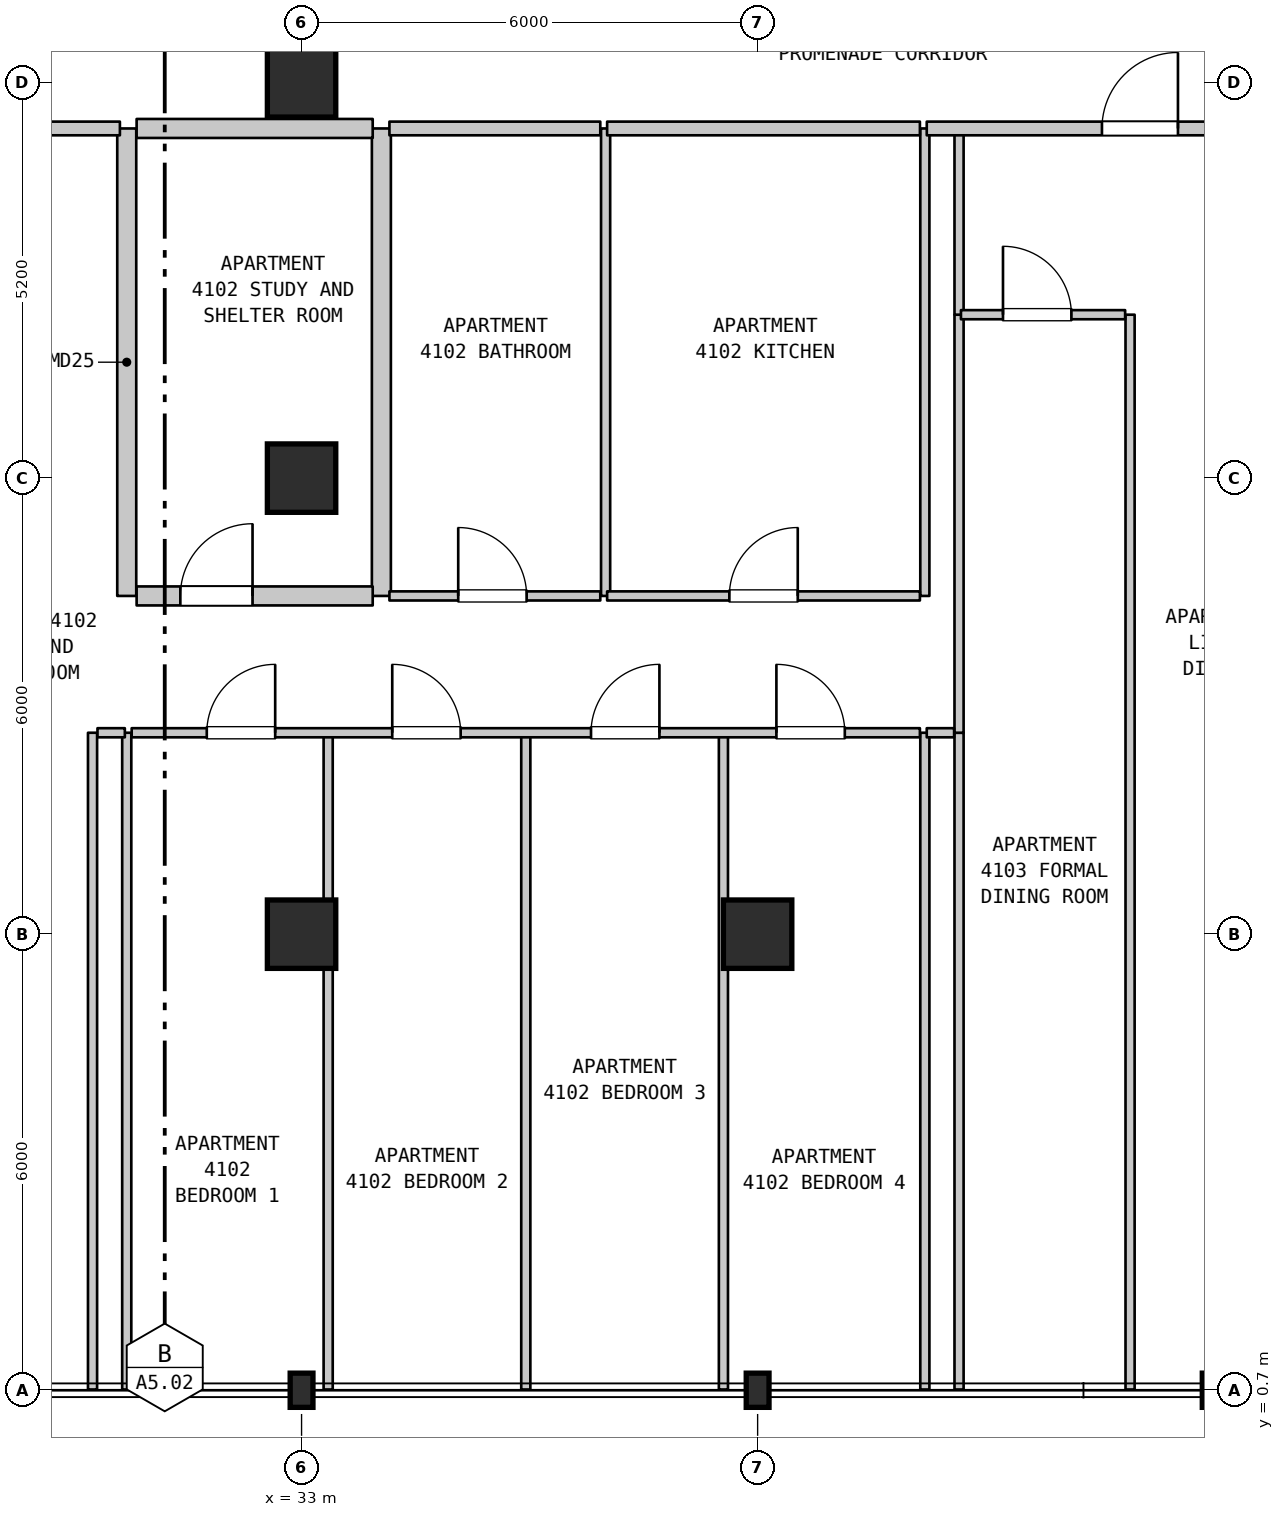
"""IFC4 building model, lengths in metres.
Left out: names, types, materials, properties, quantities, classifications, styles, units other than length and angle.
Written with IfcOpenShell. Run it as: python <this file> out.ifc"""

import sys

from ifc_helpers import new_model, si_unit, direction, frame, frame_2d, origin, origin_2d, place, context, subcontext, project, spatial, rectangle, i_section, extrude, element, fill, save


model = new_model("IFC4")
c1 = context("Model", 3, precision=1e-05, world=origin(), true_north=direction((0.0, 1.0)))
c2 = subcontext(c1, "Body", "Model", "MODEL_VIEW")
j1 = project(units=[si_unit("LENGTHUNIT", "METRE"), si_unit("PLANEANGLEUNIT", "RADIAN")], contexts=[c1])
p1 = place(None, origin())
s1 = spatial("IfcSite", under=j1, at=p1, CompositionType="ELEMENT")
p2 = place(p1, origin())
s2 = spatial("IfcBuilding", under=s1, at=p2, CompositionType="ELEMENT")
p3 = place(p2, frame((0.0, 0.0, 169.1)))
s3 = spatial("IfcBuildingStorey", under=s2, at=p3, CompositionType="ELEMENT", Elevation=169.1)
p4 = place(p3, frame((33.0, 0.7, 0.0), z_axis=(0.0, 0.0, 1.0), x_axis=(1.0, 0.0, 0.0)))
e1 = element("IfcColumn", 1, at=p4, inside=s3, PredefinedType="COLUMN", context=c2, shape_type="SweptSolid", body=[
    extrude(i_section(OverallWidth=0.3, OverallDepth=0.45, WebThickness=0.014, FlangeThickness=0.026, FilletRadius=0.027, at=origin_2d()), origin(), (0.0, 0.0, 1.0), 3.7),
])
for number, where, z_axis, x_axis in (
    (2, (33.0, 6.7, 0.0), (0.0, 0.0, 1.0), (1.0, 0.0, 0.0)),
    (3, (33.0, 12.7, 0.0), (0.0, 0.0, 1.0), (1.0, 0.0, 0.0)),
    (4, (33.0, 17.9, 0.0), (0.0, 0.0, 1.0), (1.0, 0.0, 0.0)),
):
    element("IfcColumn", number, at=place(p3, frame(where, z_axis=z_axis, x_axis=x_axis)), inside=s3, PredefinedType="COLUMN", context=c2, shape_type="SweptSolid", body=[
        extrude(rectangle(XDim=0.9, YDim=0.9, at=origin_2d()), origin(), (0.0, 0.0, 1.0), 3.7),
    ])
p5 = place(p3, frame((39.0, 0.7, 0.0), z_axis=(0.0, 0.0, 1.0), x_axis=(1.0, 0.0, 0.0)))
e5 = element("IfcColumn", 5, at=p5, inside=s3, PredefinedType="COLUMN", context=c2, shape_type="SweptSolid", body=[
    extrude(i_section(OverallWidth=0.3, OverallDepth=0.45, WebThickness=0.014, FlangeThickness=0.026, FilletRadius=0.027, at=origin_2d()), origin(), (0.0, 0.0, 1.0), 3.7),
])
p6 = place(p3, frame((39.0, 6.7, 0.0), z_axis=(0.0, 0.0, 1.0), x_axis=(1.0, 0.0, 0.0)))
e6 = element("IfcColumn", 6, at=p6, inside=s3, PredefinedType="COLUMN", context=c2, shape_type="SweptSolid", body=[
    extrude(rectangle(XDim=0.9, YDim=0.9, at=origin_2d()), origin(), (0.0, 0.0, 1.0), 3.7),
])
p7 = place(p3, frame((45.0, 0.7, 0.0), z_axis=(0.0, 0.0, 1.0), x_axis=(1.0, 0.0, 0.0)))
e7 = element("IfcColumn", 7, at=p7, inside=s3, PredefinedType="COLUMN", context=c2, shape_type="SweptSolid", body=[
    extrude(i_section(OverallWidth=0.3, OverallDepth=0.45, WebThickness=0.014, FlangeThickness=0.026, FilletRadius=0.027, at=origin_2d()), origin(), (0.0, 0.0, 1.0), 3.7),
])
for number, where, z_axis, x_axis in (
    (8, (30.25, 0.71, 0.0), (0.0, 0.0, 1.0), (0.0, 1.0, 0.0)),
    (9, (30.7, 0.71, 0.0), (0.0, 0.0, 1.0), (0.0, 1.0, 0.0)),
):
    element("IfcWall", number, at=place(p3, frame(where, z_axis=z_axis, x_axis=x_axis)), inside=s3, PredefinedType="PARTITIONING", context=c2, shape_type="SweptSolid", body=[
        extrude(rectangle(XDim=8.64, YDim=0.12, at=frame_2d((4.32, 0.0))), origin(), (0.0, 0.0, 1.0), 3.39),
    ])
p8 = place(p3, frame((30.7, 11.15, 0.0), z_axis=(0.0, 0.0, 1.0), x_axis=(0.0, 1.0, 0.0)))
e10 = element("IfcWall", 10, at=p8, inside=s3, PredefinedType="STANDARD", context=c2, shape_type="SweptSolid", body=[
    extrude(rectangle(XDim=6.15, YDim=0.25, at=frame_2d((3.075, 0.0))), origin(), (0.0, 0.0, 1.0), 3.39),
])
p9 = place(p3, frame((33.35, 0.71, 0.0), z_axis=(0.0, 0.0, 1.0), x_axis=(0.0, 1.0, 0.0)))
e11 = element("IfcWall", 11, at=p9, inside=s3, PredefinedType="PARTITIONING", context=c2, shape_type="SweptSolid", body=[
    extrude(rectangle(XDim=8.64, YDim=0.12, at=frame_2d((4.32, 0.0))), origin(), (0.0, 0.0, 1.0), 3.39),
])
p10 = place(p3, frame((34.05, 11.15, 0.0), z_axis=(0.0, 0.0, 1.0), x_axis=(0.0, 1.0, 0.0)))
e12 = element("IfcWall", 12, at=p10, inside=s3, PredefinedType="STANDARD", context=c2, shape_type="SweptSolid", body=[
    extrude(rectangle(XDim=6.15, YDim=0.25, at=frame_2d((3.075, 0.0))), origin(), (0.0, 0.0, 1.0), 3.39),
])
p11 = place(p3, frame((35.95, 0.71, 0.0), z_axis=(0.0, 0.0, 1.0), x_axis=(0.0, 1.0, 0.0)))
e13 = element("IfcWall", 13, at=p11, inside=s3, PredefinedType="PARTITIONING", context=c2, shape_type="SweptSolid", body=[
    extrude(rectangle(XDim=8.64, YDim=0.12, at=frame_2d((4.32, 0.0))), origin(), (0.0, 0.0, 1.0), 3.39),
])
p12 = place(p3, frame((37.0, 11.15, 0.0), z_axis=(0.0, 0.0, 1.0), x_axis=(0.0, 1.0, 0.0)))
e14 = element("IfcWall", 14, at=p12, inside=s3, PredefinedType="PARTITIONING", context=c2, shape_type="SweptSolid", body=[
    extrude(rectangle(XDim=6.15, YDim=0.12, at=frame_2d((3.075, 0.0))), origin(), (0.0, 0.0, 1.0), 3.39),
])
for number, where, z_axis, x_axis in (
    (15, (38.55, 0.71, 0.0), (0.0, 0.0, 1.0), (0.0, 1.0, 0.0)),
    (16, (41.2, 0.71, 0.0), (0.0, 0.0, 1.0), (0.0, 1.0, 0.0)),
):
    element("IfcWall", number, at=place(p3, frame(where, z_axis=z_axis, x_axis=x_axis)), inside=s3, PredefinedType="PARTITIONING", context=c2, shape_type="SweptSolid", body=[
        extrude(rectangle(XDim=8.64, YDim=0.12, at=frame_2d((4.32, 0.0))), origin(), (0.0, 0.0, 1.0), 3.39),
    ])
p13 = place(p3, frame((41.2, 11.15, 0.0), z_axis=(0.0, 0.0, 1.0), x_axis=(0.0, 1.0, 0.0)))
e17 = element("IfcWall", 17, at=p13, inside=s3, PredefinedType="PARTITIONING", context=c2, shape_type="SweptSolid", body=[
    extrude(rectangle(XDim=6.15, YDim=0.12, at=frame_2d((3.075, 0.0))), origin(), (0.0, 0.0, 1.0), 3.39),
])
p14 = place(p3, frame((41.65, 0.71, 0.0), z_axis=(0.0, 0.0, 1.0), x_axis=(0.0, 1.0, 0.0)))
e18 = element("IfcWall", 18, at=p14, inside=s3, PredefinedType="PARTITIONING", context=c2, shape_type="SweptSolid", body=[
    extrude(rectangle(XDim=8.64, YDim=0.12, at=frame_2d((4.32, 0.0))), origin(), (0.0, 0.0, 1.0), 3.39),
])
p15 = place(p3, frame((41.65, 9.35, 0.0), z_axis=(0.0, 0.0, 1.0), x_axis=(0.0, 1.0, 0.0)))
e19 = element("IfcWall", 19, at=p15, inside=s3, PredefinedType="PARTITIONING", context=c2, shape_type="SweptSolid", body=[
    extrude(rectangle(XDim=5.5, YDim=0.12, at=frame_2d((2.75, 0.0))), origin(), (0.0, 0.0, 1.0), 3.39),
])
p16 = place(p3, frame((41.65, 14.85, 0.0), z_axis=(0.0, 0.0, 1.0), x_axis=(0.0, 1.0, 0.0)))
e20 = element("IfcWall", 20, at=p16, inside=s3, PredefinedType="PARTITIONING", context=c2, shape_type="SweptSolid", body=[
    extrude(rectangle(XDim=2.45, YDim=0.12, at=frame_2d((1.225, 0.0))), origin(), (0.0, 0.0, 1.0), 3.39),
])
p17 = place(p3, frame((43.9, 0.71, 0.0), z_axis=(0.0, 0.0, 1.0), x_axis=(0.0, 1.0, 0.0)))
e21 = element("IfcWall", 21, at=p17, inside=s3, PredefinedType="PARTITIONING", context=c2, shape_type="SweptSolid", body=[
    extrude(rectangle(XDim=14.14, YDim=0.12, at=frame_2d((7.07, 0.0))), origin(), (0.0, 0.0, 1.0), 3.39),
])
p18 = place(p3, frame((30.315, 9.35, 0.0), z_axis=(0.0, 0.0, 1.0), x_axis=(1.0, 0.0, 0.0)))
e22 = element("IfcWall", 22, at=p18, inside=s3, PredefinedType="PARTITIONING", context=c2, shape_type="SweptSolid", body=[
    extrude(rectangle(XDim=0.36, YDim=0.12, at=frame_2d((0.18, 0.0))), origin(), (0.0, 0.0, 1.0), 3.39),
])
p19 = place(p3, frame((30.765, 9.35, 0.0), z_axis=(0.0, 0.0, 1.0), x_axis=(1.0, 0.0, 0.0)))
e23 = element("IfcWall", 23, at=p19, inside=s3, PredefinedType="PARTITIONING", context=c2, shape_type="SweptSolid", body=[
    extrude(rectangle(XDim=10.37, YDim=0.12, at=frame_2d((5.185, 0.0))), origin(), (0.0, 0.0, 1.0), 3.39),
])
p20 = place(p19, frame((0.988, 0.0, 0.0)))
e24 = element("IfcOpeningElement", 24, at=p20, cuts=e23, PredefinedType="OPENING", context=c2, shape_type="SweptSolid", body=[
    extrude(rectangle(XDim=0.9, YDim=2.15, at=frame_2d((0.45, 1.075))), frame((0.0, 0.07, 0.0), z_axis=(0.0, -1.0, 0.0), x_axis=(1.0, 0.0, 0.0)), (0.0, 0.0, 1.0), 0.14),
])
p21 = place(p19, frame((3.428, 0.0, 0.0)))
e25 = element("IfcOpeningElement", 25, at=p21, cuts=e23, PredefinedType="OPENING", context=c2, shape_type="SweptSolid", body=[
    extrude(rectangle(XDim=0.9, YDim=2.15, at=frame_2d((0.45, 1.075))), frame((0.0, 0.07, 0.0), z_axis=(0.0, -1.0, 0.0), x_axis=(1.0, 0.0, 0.0)), (0.0, 0.0, 1.0), 0.14),
])
p22 = place(p19, frame((6.043, 0.0, 0.0)))
e26 = element("IfcOpeningElement", 26, at=p22, cuts=e23, PredefinedType="OPENING", context=c2, shape_type="SweptSolid", body=[
    extrude(rectangle(XDim=0.9, YDim=2.15, at=frame_2d((0.45, 1.075))), frame((0.0, 0.07, 0.0), z_axis=(0.0, -1.0, 0.0), x_axis=(1.0, 0.0, 0.0)), (0.0, 0.0, 1.0), 0.14),
])
p23 = place(p19, frame((8.482, 0.0, 0.0)))
e27 = element("IfcOpeningElement", 27, at=p23, cuts=e23, PredefinedType="OPENING", context=c2, shape_type="SweptSolid", body=[
    extrude(rectangle(XDim=0.9, YDim=2.15, at=frame_2d((0.45, 1.075))), frame((0.0, 0.07, 0.0), z_axis=(0.0, -1.0, 0.0), x_axis=(1.0, 0.0, 0.0)), (0.0, 0.0, 1.0), 0.14),
])
p24 = place(p3, frame((41.225, 9.35, 0.0), z_axis=(0.0, 0.0, 1.0), x_axis=(1.0, 0.0, 0.0)))
e28 = element("IfcWall", 28, at=p24, inside=s3, PredefinedType="PARTITIONING", context=c2, shape_type="SweptSolid", body=[
    extrude(rectangle(XDim=0.36, YDim=0.12, at=frame_2d((0.18, 0.0))), origin(), (0.0, 0.0, 1.0), 3.39),
])
p25 = place(p3, frame((30.83, 11.15, 0.0), z_axis=(0.0, 0.0, 1.0), x_axis=(1.0, 0.0, 0.0)))
e29 = element("IfcWall", 29, at=p25, inside=s3, PredefinedType="STANDARD", context=c2, shape_type="SweptSolid", body=[
    extrude(rectangle(XDim=3.106, YDim=0.25, at=frame_2d((1.553, 0.0))), origin(), (0.0, 0.0, 1.0), 3.39),
])
p26 = place(p25, frame((0.575, 0.0, 0.0)))
e30 = element("IfcOpeningElement", 30, at=p26, cuts=e29, PredefinedType="OPENING", context=c2, shape_type="SweptSolid", body=[
    extrude(rectangle(XDim=0.95, YDim=2.15, at=frame_2d((0.475, 1.075))), frame((0.0, 0.135, 0.0), z_axis=(0.0, -1.0, 0.0), x_axis=(1.0, 0.0, 0.0)), (0.0, 0.0, 1.0), 0.27),
])
p27 = place(p3, frame((34.156, 11.15, 0.0), z_axis=(0.0, 0.0, 1.0), x_axis=(1.0, 0.0, 0.0)))
e31 = element("IfcWall", 31, at=p27, inside=s3, PredefinedType="PARTITIONING", context=c2, shape_type="SweptSolid", body=[
    extrude(rectangle(XDim=2.774, YDim=0.12, at=frame_2d((1.387, 0.0))), origin(), (0.0, 0.0, 1.0), 3.39),
])
p28 = place(p27, frame((0.905, 0.0, 0.0)))
e32 = element("IfcOpeningElement", 32, at=p28, cuts=e31, PredefinedType="OPENING", context=c2, shape_type="SweptSolid", body=[
    extrude(rectangle(XDim=0.9, YDim=2.1, at=frame_2d((0.45, 1.05))), frame((0.0, 0.07, 0.0), z_axis=(0.0, -1.0, 0.0), x_axis=(1.0, 0.0, 0.0)), (0.0, 0.0, 1.0), 0.14),
])
p29 = place(p3, frame((37.02, 11.15, 0.0), z_axis=(0.0, 0.0, 1.0), x_axis=(1.0, 0.0, 0.0)))
e33 = element("IfcWall", 33, at=p29, inside=s3, PredefinedType="PARTITIONING", context=c2, shape_type="SweptSolid", body=[
    extrude(rectangle(XDim=4.115, YDim=0.12, at=frame_2d((2.058, 0.0))), origin(), (0.0, 0.0, 1.0), 3.39),
])
p30 = place(p29, frame((1.608, 0.0, 0.0)))
e34 = element("IfcOpeningElement", 34, at=p30, cuts=e33, PredefinedType="OPENING", context=c2, shape_type="SweptSolid", body=[
    extrude(rectangle(XDim=0.9, YDim=2.15, at=frame_2d((0.45, 1.075))), frame((0.0, 0.07, 0.0), z_axis=(0.0, -1.0, 0.0), x_axis=(1.0, 0.0, 0.0)), (0.0, 0.0, 1.0), 0.14),
])
p31 = place(p3, frame((41.675, 14.85, 0.0), z_axis=(0.0, 0.0, 1.0), x_axis=(1.0, 0.0, 0.0)))
e35 = element("IfcWall", 35, at=p31, inside=s3, PredefinedType="PARTITIONING", context=c2, shape_type="SweptSolid", body=[
    extrude(rectangle(XDim=2.16, YDim=0.12, at=frame_2d((1.08, 0.0))), origin(), (0.0, 0.0, 1.0), 3.39),
])
p32 = place(p31, frame((0.553, 0.0, 0.0)))
e36 = element("IfcOpeningElement", 36, at=p32, cuts=e35, PredefinedType="OPENING", context=c2, shape_type="SweptSolid", body=[
    extrude(rectangle(XDim=0.9, YDim=2.15, at=frame_2d((0.45, 1.075))), frame((0.0, 0.07, 0.0), z_axis=(0.0, -1.0, 0.0), x_axis=(1.0, 0.0, 0.0)), (0.0, 0.0, 1.0), 0.14),
])
p33 = place(p3, frame((25.515, 17.3, 0.0), z_axis=(0.0, 0.0, 1.0), x_axis=(1.0, 0.0, 0.0)))
e37 = element("IfcWall", 37, at=p33, inside=s3, PredefinedType="STANDARD", context=c2, shape_type="SweptSolid", body=[
    extrude(rectangle(XDim=5.095, YDim=0.18, at=frame_2d((2.548, 0.0))), origin(), (0.0, 0.0, 1.0), 3.39),
])
p34 = place(p33, frame((2.08, 0.0, 0.0)))
e38 = element("IfcOpeningElement", 38, at=p34, cuts=e37, PredefinedType="OPENING", context=c2, shape_type="SweptSolid", body=[
    extrude(rectangle(XDim=1.0, YDim=2.15, at=frame_2d((0.5, 1.075))), frame((0.0, 0.1, 0.0), z_axis=(0.0, -1.0, 0.0), x_axis=(1.0, 0.0, 0.0)), (0.0, 0.0, 1.0), 0.2),
])
p35 = place(p3, frame((30.83, 17.3, 0.0), z_axis=(0.0, 0.0, 1.0), x_axis=(1.0, 0.0, 0.0)))
e39 = element("IfcWall", 39, at=p35, inside=s3, PredefinedType="STANDARD", context=c2, shape_type="SweptSolid", body=[
    extrude(rectangle(XDim=3.106, YDim=0.25, at=frame_2d((1.553, 0.0))), origin(), (0.0, 0.0, 1.0), 3.39),
])
p36 = place(p3, frame((34.156, 17.3, 0.0), z_axis=(0.0, 0.0, 1.0), x_axis=(1.0, 0.0, 0.0)))
e40 = element("IfcWall", 40, at=p36, inside=s3, PredefinedType="STANDARD", context=c2, shape_type="SweptSolid", body=[
    extrude(rectangle(XDim=2.774, YDim=0.18, at=frame_2d((1.387, 0.0))), origin(), (0.0, 0.0, 1.0), 3.39),
])
p37 = place(p3, frame((37.02, 17.3, 0.0), z_axis=(0.0, 0.0, 1.0), x_axis=(1.0, 0.0, 0.0)))
e41 = element("IfcWall", 41, at=p37, inside=s3, PredefinedType="STANDARD", context=c2, shape_type="SweptSolid", body=[
    extrude(rectangle(XDim=4.115, YDim=0.18, at=frame_2d((2.058, 0.0))), origin(), (0.0, 0.0, 1.0), 3.39),
])
p38 = place(p3, frame((41.225, 17.3, 0.0), z_axis=(0.0, 0.0, 1.0), x_axis=(1.0, 0.0, 0.0)))
e42 = element("IfcWall", 42, at=p38, inside=s3, PredefinedType="STANDARD", context=c2, shape_type="SweptSolid", body=[
    extrude(rectangle(XDim=5.545, YDim=0.18, at=frame_2d((2.772, 0.0))), origin(), (0.0, 0.0, 1.0), 3.39),
])
p39 = place(p38, frame((2.305, 0.0, 0.0)))
e43 = element("IfcOpeningElement", 43, at=p39, cuts=e42, PredefinedType="OPENING", context=c2, shape_type="SweptSolid", body=[
    extrude(rectangle(XDim=1.0, YDim=2.15, at=frame_2d((0.5, 1.075))), frame((0.0, 0.1, 0.0), z_axis=(0.0, -1.0, 0.0), x_axis=(1.0, 0.0, 0.0)), (0.0, 0.0, 1.0), 0.2),
])
p40 = place(p20, origin())
e44 = element("IfcDoor", 44, at=p40, inside=s3, OperationType="SINGLE_SWING_RIGHT", PredefinedType="DOOR", context=c2, shape_type="SweptSolid", body=[
    extrude(rectangle(XDim=0.9, YDim=2.15, at=frame_2d((0.45, 1.075))), frame((0.0, 0.025, 0.0), z_axis=(0.0, -1.0, 0.0), x_axis=(1.0, 0.0, 0.0)), (0.0, 0.0, 1.0), 0.05),
])
fill(e24, e44)
p41 = place(p21, origin())
e45 = element("IfcDoor", 45, at=p41, inside=s3, OperationType="SINGLE_SWING_LEFT", PredefinedType="DOOR", context=c2, shape_type="SweptSolid", body=[
    extrude(rectangle(XDim=0.9, YDim=2.15, at=frame_2d((0.45, 1.075))), frame((0.0, 0.025, 0.0), z_axis=(0.0, -1.0, 0.0), x_axis=(1.0, 0.0, 0.0)), (0.0, 0.0, 1.0), 0.05),
])
fill(e25, e45)
p42 = place(p22, origin())
e46 = element("IfcDoor", 46, at=p42, inside=s3, OperationType="SINGLE_SWING_RIGHT", PredefinedType="DOOR", context=c2, shape_type="SweptSolid", body=[
    extrude(rectangle(XDim=0.9, YDim=2.15, at=frame_2d((0.45, 1.075))), frame((0.0, 0.025, 0.0), z_axis=(0.0, -1.0, 0.0), x_axis=(1.0, 0.0, 0.0)), (0.0, 0.0, 1.0), 0.05),
])
fill(e26, e46)
p43 = place(p23, origin())
e47 = element("IfcDoor", 47, at=p43, inside=s3, OperationType="SINGLE_SWING_LEFT", PredefinedType="DOOR", context=c2, shape_type="SweptSolid", body=[
    extrude(rectangle(XDim=0.9, YDim=2.15, at=frame_2d((0.45, 1.075))), frame((0.0, 0.025, 0.0), z_axis=(0.0, -1.0, 0.0), x_axis=(1.0, 0.0, 0.0)), (0.0, 0.0, 1.0), 0.05),
])
fill(e27, e47)
p44 = place(p26, origin())
e48 = element("IfcDoor", 48, at=p44, inside=s3, OperationType="SINGLE_SWING_RIGHT", PredefinedType="DOOR", context=c2, shape_type="SweptSolid", body=[
    extrude(rectangle(XDim=0.95, YDim=2.15, at=frame_2d((0.475, 1.075))), frame((0.0, 0.025, 0.0), z_axis=(0.0, -1.0, 0.0), x_axis=(1.0, 0.0, 0.0)), (0.0, 0.0, 1.0), 0.05),
])
fill(e30, e48)
p45 = place(p28, origin())
e49 = element("IfcDoor", 49, at=p45, inside=s3, OperationType="SINGLE_SWING_LEFT", PredefinedType="DOOR", context=c2, shape_type="SweptSolid", body=[
    extrude(rectangle(XDim=0.9, YDim=2.1, at=frame_2d((0.45, 1.05))), frame((0.0, 0.025, 0.0), z_axis=(0.0, -1.0, 0.0), x_axis=(1.0, 0.0, 0.0)), (0.0, 0.0, 1.0), 0.05),
])
fill(e32, e49)
p46 = place(p30, origin())
e50 = element("IfcDoor", 50, at=p46, inside=s3, OperationType="SINGLE_SWING_RIGHT", PredefinedType="DOOR", context=c2, shape_type="SweptSolid", body=[
    extrude(rectangle(XDim=0.9, YDim=2.15, at=frame_2d((0.45, 1.075))), frame((0.0, 0.025, 0.0), z_axis=(0.0, -1.0, 0.0), x_axis=(1.0, 0.0, 0.0)), (0.0, 0.0, 1.0), 0.05),
])
fill(e34, e50)
p47 = place(p32, origin())
e51 = element("IfcDoor", 51, at=p47, inside=s3, OperationType="SINGLE_SWING_LEFT", PredefinedType="DOOR", context=c2, shape_type="SweptSolid", body=[
    extrude(rectangle(XDim=0.9, YDim=2.15, at=frame_2d((0.45, 1.075))), frame((0.0, 0.025, 0.0), z_axis=(0.0, -1.0, 0.0), x_axis=(1.0, 0.0, 0.0)), (0.0, 0.0, 1.0), 0.05),
])
fill(e36, e51)
p48 = place(p39, origin())
e52 = element("IfcDoor", 52, at=p48, inside=s3, OperationType="SINGLE_SWING_RIGHT", PredefinedType="DOOR", context=c2, shape_type="SweptSolid", body=[
    extrude(rectangle(XDim=1.0, YDim=2.15, at=frame_2d((0.5, 1.075))), frame((0.0, 0.025, 0.0), z_axis=(0.0, -1.0, 0.0), x_axis=(1.0, 0.0, 0.0)), (0.0, 0.0, 1.0), 0.05),
])
fill(e43, e52)
save(model, sys.argv[1])
